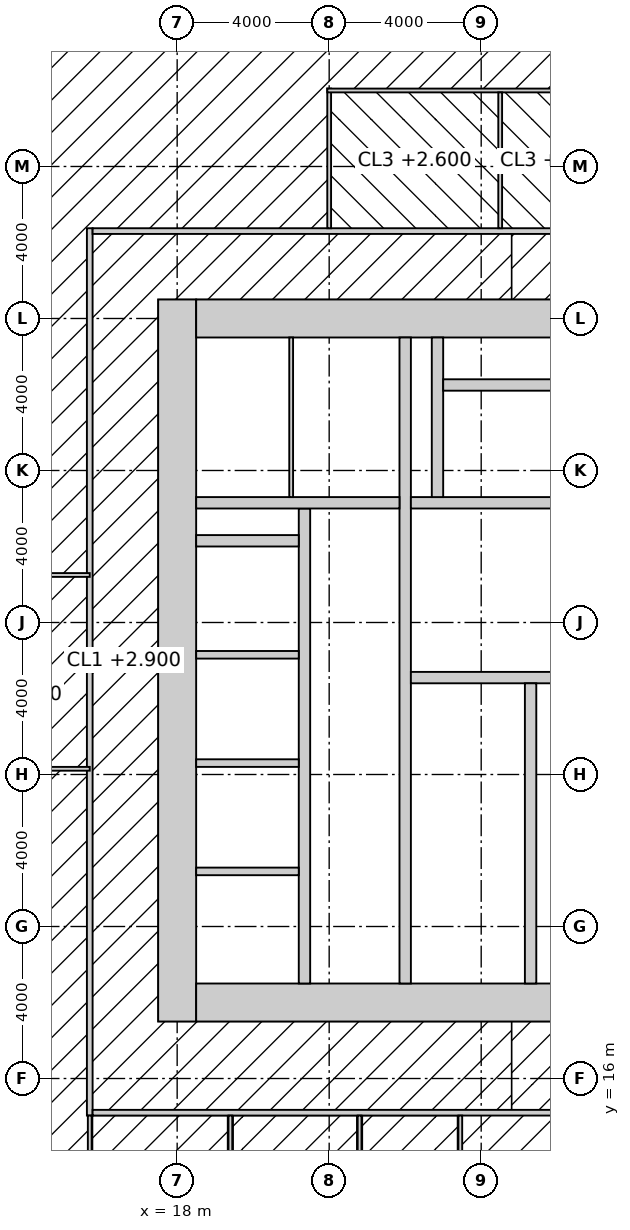
"""IFC4 building model, lengths in metres.
Left out: names, types, materials, properties, quantities, classifications, styles, units other than length and angle.
Written with IfcOpenShell. Run it as: python <this file> out.ifc"""

import sys

from ifc_helpers import new_model, si_unit, direction, frame, frame_2d, origin, place, context, subcontext, project, spatial, rectangle, extrude, element, fill, save


model = new_model("IFC4")
c1 = context("Model", 3, precision=1e-05, world=origin(), true_north=direction((0.0, 1.0)))
c2 = subcontext(c1, "Body", "Model", "MODEL_VIEW")
j1 = project(units=[si_unit("LENGTHUNIT", "METRE"), si_unit("PLANEANGLEUNIT", "RADIAN")], contexts=[c1])
p1 = place(None, origin())
s1 = spatial("IfcSite", under=j1, at=p1, CompositionType="ELEMENT")
p2 = place(p1, origin())
s2 = spatial("IfcBuilding", under=s1, at=p2, CompositionType="ELEMENT")
p3 = place(p2, frame((0.0, 0.0, 254.2)))
s3 = spatial("IfcBuildingStorey", under=s2, at=p3, CompositionType="ELEMENT", Elevation=254.2)
p4 = place(p3, frame((18.0, 17.5, -0.15), z_axis=(0.0, 0.0, 1.0), x_axis=(0.0, 1.0, 0.0)))
e1 = element("IfcWall", 1, at=p4, inside=s3, PredefinedType="SHEAR", context=c2, shape_type="SweptSolid", body=[
    extrude(rectangle(XDim=19.0, YDim=1.0, at=frame_2d((9.5, 0.0))), origin(), (0.0, 0.0, 1.0), 4.0),
])
p5 = place(p3, frame((18.5, 18.0, -0.15), z_axis=(0.0, 0.0, 1.0), x_axis=(1.0, 0.0, 0.0)))
e2 = element("IfcWall", 2, at=p5, inside=s3, PredefinedType="SHEAR", context=c2, shape_type="SweptSolid", body=[
    extrude(rectangle(XDim=17.6, YDim=1.0, at=frame_2d((8.8, 0.0))), origin(), (0.0, 0.0, 1.0), 4.0),
])
p6 = place(p5, frame((3.45, 0.0, 0.15)))
e3 = element("IfcOpeningElement", 3, at=p6, cuts=e2, PredefinedType="OPENING", context=c2, shape_type="SweptSolid", body=[
    extrude(rectangle(XDim=1.5, YDim=2.4, at=frame_2d((0.75, 1.2))), frame((0.0, 0.51, 0.0), z_axis=(0.0, -1.0, 0.0), x_axis=(1.0, 0.0, 0.0)), (0.0, 0.0, 1.0), 1.02),
])
p7 = place(p3, frame((18.5, 36.0, -0.15), z_axis=(0.0, 0.0, 1.0), x_axis=(1.0, 0.0, 0.0)))
e4 = element("IfcWall", 4, at=p7, inside=s3, PredefinedType="SHEAR", context=c2, shape_type="SweptSolid", body=[
    extrude(rectangle(XDim=17.6, YDim=1.0, at=frame_2d((8.8, 0.0))), origin(), (0.0, 0.0, 1.0), 4.0),
])
p8 = place(p3, frame((24.0, 18.5, -0.15), z_axis=(0.0, 0.0, 1.0), x_axis=(0.0, 1.0, 0.0)))
e5 = element("IfcWall", 5, at=p8, inside=s3, PredefinedType="SHEAR", context=c2, shape_type="SweptSolid", body=[
    extrude(rectangle(XDim=17.0, YDim=0.3, at=frame_2d((8.5, 0.0))), origin(), (0.0, 0.0, 1.0), 4.0),
])
p9 = place(p8, frame((9.6, 0.0, 0.15)))
e6 = element("IfcOpeningElement", 6, at=p9, cuts=e5, PredefinedType="OPENING", context=c2, shape_type="SweptSolid", body=[
    extrude(rectangle(XDim=1.5, YDim=2.4, at=frame_2d((0.75, 1.2))), frame((0.0, 0.16, 0.0), z_axis=(0.0, -1.0, 0.0), x_axis=(1.0, 0.0, 0.0)), (0.0, 0.0, 1.0), 0.32),
])
p10 = place(p3, frame((24.15, 26.55, -0.15), z_axis=(0.0, 0.0, 1.0), x_axis=(1.0, 0.0, 0.0)))
e7 = element("IfcWall", 7, at=p10, inside=s3, PredefinedType="SHEAR", context=c2, shape_type="SweptSolid", body=[
    extrude(rectangle(XDim=11.25, YDim=0.3, at=frame_2d((5.625, 0.0))), origin(), (0.0, 0.0, 1.0), 4.0),
])
p11 = place(p10, frame((9.25, 0.0, 0.15)))
e8 = element("IfcOpeningElement", 8, at=p11, cuts=e7, PredefinedType="OPENING", context=c2, shape_type="SweptSolid", body=[
    extrude(rectangle(XDim=1.0, YDim=2.2, at=frame_2d((0.5, 1.1))), frame((0.0, 0.16, 0.0), z_axis=(0.0, -1.0, 0.0), x_axis=(1.0, 0.0, 0.0)), (0.0, 0.0, 1.0), 0.32),
])
p12 = place(p10, frame((4.9, 0.0, 0.15)))
e9 = element("IfcOpeningElement", 9, at=p12, cuts=e7, PredefinedType="OPENING", context=c2, shape_type="SweptSolid", body=[
    extrude(rectangle(XDim=1.5, YDim=2.4, at=frame_2d((0.75, 1.2))), frame((0.0, 0.16, 0.0), z_axis=(0.0, -1.0, 0.0), x_axis=(1.0, 0.0, 0.0)), (0.0, 0.0, 1.0), 0.32),
])
p13 = place(p3, frame((27.3, 18.5, -0.15), z_axis=(0.0, 0.0, 1.0), x_axis=(0.0, 1.0, 0.0)))
e10 = element("IfcWall", 10, at=p13, inside=s3, PredefinedType="SHEAR", context=c2, shape_type="SweptSolid", body=[
    extrude(rectangle(XDim=7.9, YDim=0.3, at=frame_2d((3.95, 0.0))), origin(), (0.0, 0.0, 1.0), 4.0),
])
p14 = place(p13, frame((6.4, 0.0, 0.15)))
e11 = element("IfcOpeningElement", 11, at=p14, cuts=e10, PredefinedType="OPENING", context=c2, shape_type="SweptSolid", body=[
    extrude(rectangle(XDim=1.0, YDim=2.2, at=frame_2d((0.5, 1.1))), frame((0.0, 0.16, 0.0), z_axis=(0.0, -1.0, 0.0), x_axis=(1.0, 0.0, 0.0)), (0.0, 0.0, 1.0), 0.32),
])
p15 = place(p3, frame((24.15, 31.15, -0.15), z_axis=(0.0, 0.0, 1.0), x_axis=(1.0, 0.0, 0.0)))
e12 = element("IfcWall", 12, at=p15, inside=s3, PredefinedType="SHEAR", context=c2, shape_type="SweptSolid", body=[
    extrude(rectangle(XDim=11.25, YDim=0.3, at=frame_2d((5.625, 0.0))), origin(), (0.0, 0.0, 1.0), 4.0),
])
p16 = place(p15, frame((3.15, 0.0, 0.15)))
e13 = element("IfcOpeningElement", 13, at=p16, cuts=e12, PredefinedType="OPENING", context=c2, shape_type="SweptSolid", body=[
    extrude(rectangle(XDim=1.0, YDim=2.2, at=frame_2d((0.5, 1.1))), frame((0.0, 0.16, 0.0), z_axis=(0.0, -1.0, 0.0), x_axis=(1.0, 0.0, 0.0)), (0.0, 0.0, 1.0), 0.32),
])
p17 = place(p15, frame((7.25, 0.0, 0.15)))
e14 = element("IfcOpeningElement", 14, at=p17, cuts=e12, PredefinedType="OPENING", context=c2, shape_type="SweptSolid", body=[
    extrude(rectangle(XDim=1.4, YDim=2.4, at=frame_2d((0.7, 1.2))), frame((0.0, 0.16, 0.0), z_axis=(0.0, -1.0, 0.0), x_axis=(1.0, 0.0, 0.0)), (0.0, 0.0, 1.0), 0.32),
])
p18 = place(p3, frame((21.35, 18.5, -0.15), z_axis=(0.0, 0.0, 1.0), x_axis=(0.0, 1.0, 0.0)))
e15 = element("IfcWall", 15, at=p18, inside=s3, PredefinedType="SHEAR", context=c2, shape_type="SweptSolid", body=[
    extrude(rectangle(XDim=12.5, YDim=0.3, at=frame_2d((6.25, 0.0))), origin(), (0.0, 0.0, 1.0), 4.0),
])
p19 = place(p18, frame((0.875, 0.0, 0.15)))
e16 = element("IfcOpeningElement", 16, at=p19, cuts=e15, PredefinedType="OPENING", context=c2, shape_type="SweptSolid", body=[
    extrude(rectangle(XDim=1.1, YDim=2.2, at=frame_2d((0.55, 1.1))), frame((0.0, 0.16, 0.0), z_axis=(0.0, -1.0, 0.0), x_axis=(1.0, 0.0, 0.0)), (0.0, 0.0, 1.0), 0.32),
])
p20 = place(p18, frame((3.825, 0.0, 0.15)))
e17 = element("IfcOpeningElement", 17, at=p20, cuts=e15, PredefinedType="OPENING", context=c2, shape_type="SweptSolid", body=[
    extrude(rectangle(XDim=1.1, YDim=2.2, at=frame_2d((0.55, 1.1))), frame((0.0, 0.16, 0.0), z_axis=(0.0, -1.0, 0.0), x_axis=(1.0, 0.0, 0.0)), (0.0, 0.0, 1.0), 0.32),
])
p21 = place(p18, frame((6.675, 0.0, 0.15)))
e18 = element("IfcOpeningElement", 18, at=p21, cuts=e15, PredefinedType="OPENING", context=c2, shape_type="SweptSolid", body=[
    extrude(rectangle(XDim=1.1, YDim=2.2, at=frame_2d((0.55, 1.1))), frame((0.0, 0.16, 0.0), z_axis=(0.0, -1.0, 0.0), x_axis=(1.0, 0.0, 0.0)), (0.0, 0.0, 1.0), 0.32),
])
p22 = place(p18, frame((9.575, 0.0, 0.15)))
e19 = element("IfcOpeningElement", 19, at=p22, cuts=e15, PredefinedType="OPENING", context=c2, shape_type="SweptSolid", body=[
    extrude(rectangle(XDim=1.1, YDim=2.2, at=frame_2d((0.55, 1.1))), frame((0.0, 0.16, 0.0), z_axis=(0.0, -1.0, 0.0), x_axis=(1.0, 0.0, 0.0)), (0.0, 0.0, 1.0), 0.32),
])
p23 = place(p3, frame((18.5, 31.15, -0.15), z_axis=(0.0, 0.0, 1.0), x_axis=(1.0, 0.0, 0.0)))
e20 = element("IfcWall", 20, at=p23, inside=s3, PredefinedType="SHEAR", context=c2, shape_type="SweptSolid", body=[
    extrude(rectangle(XDim=5.35, YDim=0.3, at=frame_2d((2.675, 0.0))), origin(), (0.0, 0.0, 1.0), 4.0),
])
p24 = place(p23, frame((3.4, 0.0, 0.15)))
e21 = element("IfcOpeningElement", 21, at=p24, cuts=e20, PredefinedType="OPENING", context=c2, shape_type="SweptSolid", body=[
    extrude(rectangle(XDim=1.0, YDim=2.2, at=frame_2d((0.5, 1.1))), frame((0.0, 0.16, 0.0), z_axis=(0.0, -1.0, 0.0), x_axis=(1.0, 0.0, 0.0)), (0.0, 0.0, 1.0), 0.32),
])
p25 = place(p3, frame((18.5, 30.15, -0.15), z_axis=(0.0, 0.0, 1.0), x_axis=(1.0, 0.0, 0.0)))
e22 = element("IfcWall", 22, at=p25, inside=s3, PredefinedType="SHEAR", context=c2, shape_type="SweptSolid", body=[
    extrude(rectangle(XDim=2.7, YDim=0.3, at=frame_2d((1.35, 0.0))), origin(), (0.0, 0.0, 1.0), 4.0),
])
p26 = place(p3, frame((24.85, 31.3, -0.15), z_axis=(0.0, 0.0, 1.0), x_axis=(0.0, 1.0, 0.0)))
e23 = element("IfcWall", 23, at=p26, inside=s3, PredefinedType="SHEAR", context=c2, shape_type="SweptSolid", body=[
    extrude(rectangle(XDim=4.2, YDim=0.3, at=frame_2d((2.1, 0.0))), origin(), (0.0, 0.0, 1.0), 4.0),
])
p27 = place(p3, frame((25.0, 34.25, -0.15), z_axis=(0.0, 0.0, 1.0), x_axis=(1.0, 0.0, 0.0)))
e24 = element("IfcWall", 24, at=p27, inside=s3, PredefinedType="SHEAR", context=c2, shape_type="SweptSolid", body=[
    extrude(rectangle(XDim=8.6, YDim=0.3, at=frame_2d((4.3, 0.0))), origin(), (0.0, 0.0, 1.0), 4.0),
])
for number, where, z_axis, x_axis in (
    (25, (18.5, 21.45, -0.15), (0.0, 0.0, 1.0), (1.0, 0.0, 0.0)),
    (26, (18.5, 24.3, -0.15), (0.0, 0.0, 1.0), (1.0, 0.0, 0.0)),
    (27, (18.5, 27.15, -0.15), (0.0, 0.0, 1.0), (1.0, 0.0, 0.0)),
):
    element("IfcWall", number, at=place(p3, frame(where, z_axis=z_axis, x_axis=x_axis)), inside=s3, PredefinedType="SOLIDWALL", context=c2, shape_type="SweptSolid", body=[
        extrude(rectangle(XDim=2.7, YDim=0.2, at=frame_2d((1.35, 0.0))), origin(), (0.0, 0.0, 1.0), 4.0),
    ])
p28 = place(p3, frame((21.0, 31.3, 0.0), z_axis=(0.0, 0.0, 1.0), x_axis=(0.0, 1.0, 0.0)))
e28 = element("IfcWall", 28, at=p28, inside=s3, PredefinedType="PARTITIONING", context=c2, shape_type="SweptSolid", body=[
    extrude(rectangle(XDim=4.2, YDim=0.1, at=frame_2d((2.1, 0.0))), origin(), (0.0, 0.0, 1.0), 3.85),
])
p29 = place(p28, frame((1.55, 0.0, 0.0)))
e29 = element("IfcOpeningElement", 29, at=p29, cuts=e28, PredefinedType="OPENING", context=c2, shape_type="SweptSolid", body=[
    extrude(rectangle(XDim=1.0, YDim=2.2, at=frame_2d((0.5, 1.1))), frame((0.0, 0.06, 0.0), z_axis=(0.0, -1.0, 0.0), x_axis=(1.0, 0.0, 0.0)), (0.0, 0.0, 1.0), 0.12),
])
p30 = place(p3, frame((15.7, 15.025, 0.0), z_axis=(0.0, 0.0, 1.0), x_axis=(0.0, 1.0, 0.0)))
e30 = element("IfcWall", 30, at=p30, inside=s3, PredefinedType="PARTITIONING", context=c2, shape_type="SweptSolid", body=[
    extrude(rectangle(XDim=23.35, YDim=0.15, at=frame_2d((11.675, 0.0))), origin(), (0.0, 0.0, 1.0), 3.85),
])
p31 = place(p30, frame((10.775, 0.0, 0.0)))
e31 = element("IfcOpeningElement", 31, at=p31, cuts=e30, PredefinedType="OPENING", context=c2, shape_type="SweptSolid", body=[
    extrude(rectangle(XDim=1.8, YDim=2.4, at=frame_2d((0.9, 1.2))), frame((0.0, 0.085, 0.0), z_axis=(0.0, -1.0, 0.0), x_axis=(1.0, 0.0, 0.0)), (0.0, 0.0, 1.0), 0.17),
])
p32 = place(p3, frame((15.775, 15.1, 0.0), z_axis=(0.0, 0.0, 1.0), x_axis=(1.0, 0.0, 0.0)))
e32 = element("IfcWall", 32, at=p32, inside=s3, PredefinedType="PARTITIONING", context=c2, shape_type="SweptSolid", body=[
    extrude(rectangle(XDim=22.65, YDim=0.15, at=frame_2d((11.325, 0.0))), origin(), (0.0, 0.0, 1.0), 3.85),
])
p33 = place(p3, frame((15.775, 38.3, 0.0), z_axis=(0.0, 0.0, 1.0), x_axis=(1.0, 0.0, 0.0)))
e33 = element("IfcWall", 33, at=p33, inside=s3, PredefinedType="PARTITIONING", context=c2, shape_type="SweptSolid", body=[
    extrude(rectangle(XDim=22.65, YDim=0.15, at=frame_2d((11.325, 0.0))), origin(), (0.0, 0.0, 1.0), 3.85),
])
p34 = place(p33, frame((7.975, 0.0, 0.0)))
e34 = element("IfcOpeningElement", 34, at=p34, cuts=e33, PredefinedType="OPENING", context=c2, shape_type="SweptSolid", body=[
    extrude(rectangle(XDim=0.9, YDim=2.1, at=frame_2d((0.45, 1.05))), frame((0.0, 0.085, 0.0), z_axis=(0.0, -1.0, 0.0), x_axis=(1.0, 0.0, 0.0)), (0.0, 0.0, 1.0), 0.17),
])
p35 = place(p33, frame((11.725, 0.0, 0.0)))
e35 = element("IfcOpeningElement", 35, at=p35, cuts=e33, PredefinedType="OPENING", context=c2, shape_type="SweptSolid", body=[
    extrude(rectangle(XDim=1.0, YDim=2.1, at=frame_2d((0.5, 1.05))), frame((0.0, 0.085, 0.0), z_axis=(0.0, -1.0, 0.0), x_axis=(1.0, 0.0, 0.0)), (0.0, 0.0, 1.0), 0.17),
])
p36 = place(p33, frame((15.575, 0.0, 0.0)))
e36 = element("IfcOpeningElement", 36, at=p36, cuts=e33, PredefinedType="OPENING", context=c2, shape_type="SweptSolid", body=[
    extrude(rectangle(XDim=0.9, YDim=2.1, at=frame_2d((0.45, 1.05))), frame((0.0, 0.085, 0.0), z_axis=(0.0, -1.0, 0.0), x_axis=(1.0, 0.0, 0.0)), (0.0, 0.0, 1.0), 0.17),
])
p37 = place(p3, frame((22.0, 38.375, 0.0), z_axis=(0.0, 0.0, 1.0), x_axis=(0.0, 1.0, 0.0)))
e37 = element("IfcWall", 37, at=p37, inside=s3, PredefinedType="PARTITIONING", context=c2, shape_type="SweptSolid", body=[
    extrude(rectangle(XDim=3.675, YDim=0.1, at=frame_2d((1.837, 0.0))), origin(), (0.0, 0.0, 1.0), 2.95),
])
p38 = place(p3, frame((21.95, 42.0, 0.0), z_axis=(0.0, 0.0, 1.0), x_axis=(1.0, 0.0, 0.0)))
e38 = element("IfcWall", 38, at=p38, inside=s3, PredefinedType="PARTITIONING", context=c2, shape_type="SweptSolid", body=[
    extrude(rectangle(XDim=12.1, YDim=0.1, at=frame_2d((6.05, 0.0))), origin(), (0.0, 0.0, 1.0), 3.85),
])
p39 = place(p3, frame((26.5, 38.375, 0.0), z_axis=(0.0, 0.0, 1.0), x_axis=(0.0, 1.0, 0.0)))
e39 = element("IfcWall", 39, at=p39, inside=s3, PredefinedType="PARTITIONING", context=c2, shape_type="SweptSolid", body=[
    extrude(rectangle(XDim=3.575, YDim=0.1, at=frame_2d((1.788, 0.0))), origin(), (0.0, 0.0, 1.0), 3.85),
])
for number, where, z_axis, x_axis in (
    (40, (15.7, 11.55, 0.0), (0.0, 0.0, 1.0), (0.0, 1.0, 0.0)),
    (41, (19.4, 11.55, 0.0), (0.0, 0.0, 1.0), (0.0, 1.0, 0.0)),
    (42, (22.8, 11.55, 0.0), (0.0, 0.0, 1.0), (0.0, 1.0, 0.0)),
    (43, (25.45, 11.55, 0.0), (0.0, 0.0, 1.0), (0.0, 1.0, 0.0)),
):
    element("IfcWall", number, at=place(p3, frame(where, z_axis=z_axis, x_axis=x_axis)), inside=s3, PredefinedType="PARTITIONING", context=c2, shape_type="SweptSolid", body=[
        extrude(rectangle(XDim=3.475, YDim=0.1, at=frame_2d((1.737, 0.0))), origin(), (0.0, 0.0, 1.0), 3.85),
    ])
p40 = place(p3, frame((15.7, 29.25, 0.0), z_axis=(0.0, 0.0, 1.0), x_axis=(-1.0, 0.0, 0.0)))
e44 = element("IfcWall", 44, at=p40, inside=s3, PredefinedType="PARTITIONING", context=c2, shape_type="SweptSolid", body=[
    extrude(rectangle(XDim=4.5, YDim=0.1, at=frame_2d((2.25, 0.0))), origin(), (0.0, 0.0, 1.0), 3.85),
])
p41 = place(p3, frame((11.2, 24.15, 0.0), z_axis=(0.0, 0.0, 1.0), x_axis=(1.0, 0.0, 0.0)))
e45 = element("IfcWall", 45, at=p41, inside=s3, PredefinedType="PARTITIONING", context=c2, shape_type="SweptSolid", body=[
    extrude(rectangle(XDim=4.5, YDim=0.1, at=frame_2d((2.25, 0.0))), origin(), (0.0, 0.0, 1.0), 2.95),
])
p42 = place(p14, origin())
e46 = element("IfcDoor", 46, at=p42, inside=s3, OperationType="SINGLE_SWING_RIGHT", PredefinedType="DOOR", context=c2, shape_type="SweptSolid", body=[
    extrude(rectangle(XDim=1.0, YDim=2.2, at=frame_2d((0.5, 1.1))), frame((0.0, 0.025, 0.0), z_axis=(0.0, -1.0, 0.0), x_axis=(1.0, 0.0, 0.0)), (0.0, 0.0, 1.0), 0.05),
])
fill(e11, e46)
p43 = place(p9, origin())
e47 = element("IfcDoor", 47, at=p43, inside=s3, OperationType="DOUBLE_DOOR_DOUBLE_SWING", PredefinedType="DOOR", context=c2, shape_type="SweptSolid", body=[
    extrude(rectangle(XDim=1.5, YDim=2.4, at=frame_2d((0.75, 1.2))), frame((0.0, 0.025, 0.0), z_axis=(0.0, -1.0, 0.0), x_axis=(1.0, 0.0, 0.0)), (0.0, 0.0, 1.0), 0.05),
])
fill(e6, e47)
p44 = place(p24, origin())
e48 = element("IfcDoor", 48, at=p44, inside=s3, OperationType="SINGLE_SWING_LEFT", PredefinedType="DOOR", context=c2, shape_type="SweptSolid", body=[
    extrude(rectangle(XDim=1.0, YDim=2.2, at=frame_2d((0.5, 1.1))), frame((0.0, 0.025, 0.0), z_axis=(0.0, -1.0, 0.0), x_axis=(1.0, 0.0, 0.0)), (0.0, 0.0, 1.0), 0.05),
])
fill(e21, e48)
p45 = place(p29, origin())
e49 = element("IfcDoor", 49, at=p45, inside=s3, OperationType="SINGLE_SWING_LEFT", PredefinedType="DOOR", context=c2, shape_type="SweptSolid", body=[
    extrude(rectangle(XDim=1.0, YDim=2.2, at=frame_2d((0.5, 1.1))), frame((0.0, 0.025, 0.0), z_axis=(0.0, -1.0, 0.0), x_axis=(1.0, 0.0, 0.0)), (0.0, 0.0, 1.0), 0.05),
])
fill(e29, e49)
p46 = place(p16, origin())
e50 = element("IfcDoor", 50, at=p46, inside=s3, OperationType="SINGLE_SWING_LEFT", PredefinedType="DOOR", context=c2, shape_type="SweptSolid", body=[
    extrude(rectangle(XDim=1.0, YDim=2.2, at=frame_2d((0.5, 1.1))), frame((0.0, 0.025, 0.0), z_axis=(0.0, -1.0, 0.0), x_axis=(1.0, 0.0, 0.0)), (0.0, 0.0, 1.0), 0.05),
])
fill(e13, e50)
p47 = place(p6, origin())
e51 = element("IfcDoor", 51, at=p47, inside=s3, OperationType="DOUBLE_DOOR_DOUBLE_SWING", PredefinedType="DOOR", context=c2, shape_type="SweptSolid", body=[
    extrude(rectangle(XDim=1.5, YDim=2.4, at=frame_2d((0.75, 1.2))), frame((0.0, 0.025, 0.0), z_axis=(0.0, -1.0, 0.0), x_axis=(1.0, 0.0, 0.0)), (0.0, 0.0, 1.0), 0.05),
])
fill(e3, e51)
p48 = place(p34, origin())
e52 = element("IfcDoor", 52, at=p48, inside=s3, OperationType="SINGLE_SWING_LEFT", PredefinedType="DOOR", context=c2, shape_type="SweptSolid", body=[
    extrude(rectangle(XDim=0.9, YDim=2.1, at=frame_2d((0.45, 1.05))), frame((0.0, 0.025, 0.0), z_axis=(0.0, -1.0, 0.0), x_axis=(1.0, 0.0, 0.0)), (0.0, 0.0, 1.0), 0.05),
])
fill(e34, e52)
p49 = place(p35, origin())
e53 = element("IfcDoor", 53, at=p49, inside=s3, OperationType="SLIDING_TO_LEFT", PredefinedType="DOOR", context=c2, shape_type="SweptSolid", body=[
    extrude(rectangle(XDim=1.0, YDim=2.1, at=frame_2d((0.5, 1.05))), frame((0.0, 0.025, 0.0), z_axis=(0.0, -1.0, 0.0), x_axis=(1.0, 0.0, 0.0)), (0.0, 0.0, 1.0), 0.05),
])
fill(e35, e53)
p50 = place(p31, origin())
e54 = element("IfcDoor", 54, at=p50, inside=s3, OperationType="DOUBLE_DOOR_DOUBLE_SWING", PredefinedType="DOOR", context=c2, shape_type="SweptSolid", body=[
    extrude(rectangle(XDim=1.8, YDim=2.4, at=frame_2d((0.9, 1.2))), frame((0.0, 0.025, 0.0), z_axis=(0.0, -1.0, 0.0), x_axis=(1.0, 0.0, 0.0)), (0.0, 0.0, 1.0), 0.05),
])
fill(e31, e54)
p51 = place(p19, origin())
e55 = element("IfcDoor", 55, at=p51, inside=s3, OperationType="DOUBLE_DOOR_SLIDING", PredefinedType="DOOR", context=c2, shape_type="SweptSolid", body=[
    extrude(rectangle(XDim=1.1, YDim=2.2, at=frame_2d((0.55, 1.1))), frame((0.0, 0.025, 0.0), z_axis=(0.0, -1.0, 0.0), x_axis=(1.0, 0.0, 0.0)), (0.0, 0.0, 1.0), 0.05),
])
fill(e16, e55)
p52 = place(p20, origin())
e56 = element("IfcDoor", 56, at=p52, inside=s3, OperationType="DOUBLE_DOOR_SLIDING", PredefinedType="DOOR", context=c2, shape_type="SweptSolid", body=[
    extrude(rectangle(XDim=1.1, YDim=2.2, at=frame_2d((0.55, 1.1))), frame((0.0, 0.025, 0.0), z_axis=(0.0, -1.0, 0.0), x_axis=(1.0, 0.0, 0.0)), (0.0, 0.0, 1.0), 0.05),
])
fill(e17, e56)
p53 = place(p21, origin())
e57 = element("IfcDoor", 57, at=p53, inside=s3, OperationType="DOUBLE_DOOR_SLIDING", PredefinedType="DOOR", context=c2, shape_type="SweptSolid", body=[
    extrude(rectangle(XDim=1.1, YDim=2.2, at=frame_2d((0.55, 1.1))), frame((0.0, 0.025, 0.0), z_axis=(0.0, -1.0, 0.0), x_axis=(1.0, 0.0, 0.0)), (0.0, 0.0, 1.0), 0.05),
])
fill(e18, e57)
p54 = place(p22, origin())
e58 = element("IfcDoor", 58, at=p54, inside=s3, OperationType="DOUBLE_DOOR_SLIDING", PredefinedType="DOOR", context=c2, shape_type="SweptSolid", body=[
    extrude(rectangle(XDim=1.1, YDim=2.2, at=frame_2d((0.55, 1.1))), frame((0.0, 0.025, 0.0), z_axis=(0.0, -1.0, 0.0), x_axis=(1.0, 0.0, 0.0)), (0.0, 0.0, 1.0), 0.05),
])
fill(e19, e58)
save(model, sys.argv[1])
